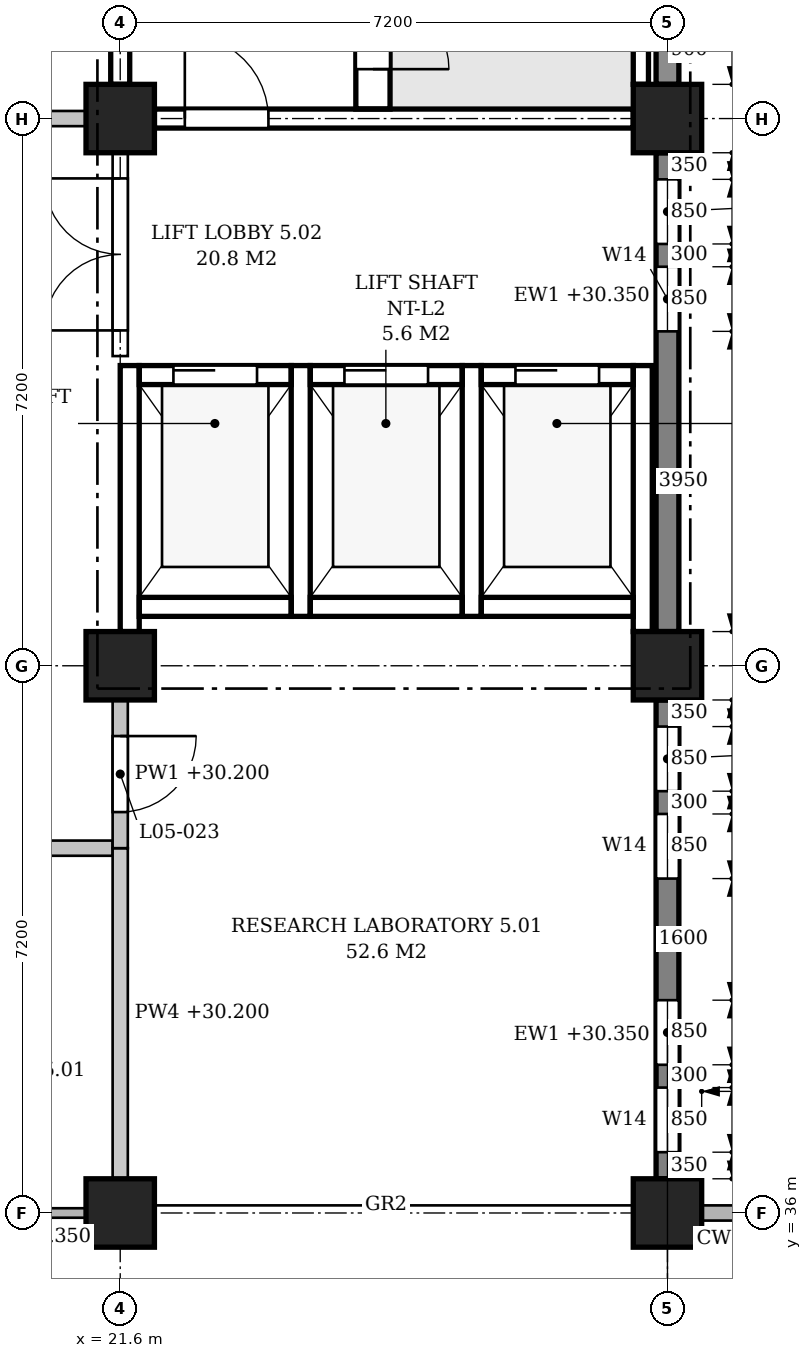
"""IFC4 building model, lengths in metres.
Left out: names, types, materials, properties, quantities, classifications, styles, units other than length and angle.
Written with IfcOpenShell. Run it as: python <this file> out.ifc"""

import sys

from ifc_helpers import new_model, si_unit, direction, frame, frame_2d, origin, origin_2d, place, context, subcontext, project, spatial, polyline, rectangle, outline, extrude, element, fill, save


model = new_model("IFC4")
c1 = context("Model", 3, precision=1e-05, world=origin(), true_north=direction((0.0, 1.0)))
c2 = subcontext(c1, "Body", "Model", "MODEL_VIEW")
j1 = project(units=[si_unit("LENGTHUNIT", "METRE"), si_unit("PLANEANGLEUNIT", "RADIAN")], contexts=[c1])
p1 = place(None, origin())
s1 = spatial("IfcSite", under=j1, at=p1, CompositionType="ELEMENT")
p2 = place(p1, origin())
s2 = spatial("IfcBuilding", under=s1, at=p2, CompositionType="ELEMENT")
p3 = place(p2, frame((0.0, 0.0, 26.4)))
s3 = spatial("IfcBuildingStorey", under=s2, at=p3, CompositionType="ELEMENT", Elevation=26.4)
for number, where, z_axis, x_axis in (
    (1, (21.6, 36.0, 0.0), (0.0, 0.0, 1.0), (1.0, 0.0, 0.0)),
    (2, (21.6, 43.2, 0.0), (0.0, 0.0, 1.0), (1.0, 0.0, 0.0)),
    (3, (21.6, 50.4, 0.0), (0.0, 0.0, 1.0), (1.0, 0.0, 0.0)),
    (4, (28.8, 36.0, 0.0), (0.0, 0.0, 1.0), (1.0, 0.0, 0.0)),
    (5, (28.8, 43.2, 0.0), (0.0, 0.0, 1.0), (1.0, 0.0, 0.0)),
    (6, (28.8, 50.4, 0.0), (0.0, 0.0, 1.0), (1.0, 0.0, 0.0)),
):
    element("IfcColumn", number, at=place(p3, frame(where, z_axis=z_axis, x_axis=x_axis)), inside=s3, PredefinedType="COLUMN", context=c2, shape_type="SweptSolid", body=[
        extrude(rectangle(XDim=0.9, YDim=0.9, at=origin_2d()), origin(), (0.0, 0.0, 1.0), 4.8),
    ])
p4 = place(p3, frame((28.8, 36.45, 0.0), z_axis=(0.0, 0.0, 1.0), x_axis=(0.0, 1.0, 0.0)))
e7 = element("IfcWall", 7, at=p4, inside=s3, PredefinedType="STANDARD", context=c2, shape_type="SweptSolid", body=[
    extrude(rectangle(XDim=6.3, YDim=0.3, at=frame_2d((3.15, 0.0))), origin(), (0.0, 0.0, 1.0), 3.95),
])
p5 = place(p4, frame((0.35, 0.0, 0.9)))
e8 = element("IfcOpeningElement", 8, at=p5, cuts=e7, PredefinedType="OPENING", context=c2, shape_type="SweptSolid", body=[
    extrude(outline(polyline([(0.0, 0.0), (0.85, 0.0), (0.85, 2.05), (0.425, 2.5), (0.0, 2.05), (0.0, 0.0)])), frame((0.0, 0.16, 0.0), z_axis=(0.0, -1.0, 0.0), x_axis=(1.0, 0.0, 0.0)), (0.0, 0.0, 1.0), 0.32),
])
p6 = place(p4, frame((1.5, 0.0, 0.9)))
e9 = element("IfcOpeningElement", 9, at=p6, cuts=e7, PredefinedType="OPENING", context=c2, shape_type="SweptSolid", body=[
    extrude(outline(polyline([(0.0, 0.0), (0.85, 0.0), (0.85, 2.05), (0.425, 2.5), (0.0, 2.05), (0.0, 0.0)])), frame((0.0, 0.16, 0.0), z_axis=(0.0, -1.0, 0.0), x_axis=(1.0, 0.0, 0.0)), (0.0, 0.0, 1.0), 0.32),
])
p7 = place(p4, frame((3.95, 0.0, 0.9)))
e10 = element("IfcOpeningElement", 10, at=p7, cuts=e7, PredefinedType="OPENING", context=c2, shape_type="SweptSolid", body=[
    extrude(outline(polyline([(0.0, 0.0), (0.85, 0.0), (0.85, 2.05), (0.425, 2.5), (0.0, 2.05), (0.0, 0.0)])), frame((0.0, 0.16, 0.0), z_axis=(0.0, -1.0, 0.0), x_axis=(1.0, 0.0, 0.0)), (0.0, 0.0, 1.0), 0.32),
])
p8 = place(p4, frame((5.1, 0.0, 0.9)))
e11 = element("IfcOpeningElement", 11, at=p8, cuts=e7, PredefinedType="OPENING", context=c2, shape_type="SweptSolid", body=[
    extrude(outline(polyline([(0.0, 0.0), (0.85, 0.0), (0.85, 2.05), (0.425, 2.5), (0.0, 2.05), (0.0, 0.0)])), frame((0.0, 0.16, 0.0), z_axis=(0.0, -1.0, 0.0), x_axis=(1.0, 0.0, 0.0)), (0.0, 0.0, 1.0), 0.32),
])
p9 = place(p3, frame((28.8, 43.65, 0.0), z_axis=(0.0, 0.0, 1.0), x_axis=(0.0, 1.0, 0.0)))
e12 = element("IfcWall", 12, at=p9, inside=s3, PredefinedType="STANDARD", context=c2, shape_type="SweptSolid", body=[
    extrude(rectangle(XDim=6.3, YDim=0.3, at=frame_2d((3.15, 0.0))), origin(), (0.0, 0.0, 1.0), 3.95),
])
p10 = place(p9, frame((3.95, 0.0, 0.9)))
e13 = element("IfcOpeningElement", 13, at=p10, cuts=e12, PredefinedType="OPENING", context=c2, shape_type="SweptSolid", body=[
    extrude(outline(polyline([(0.0, 0.0), (0.85, 0.0), (0.85, 2.05), (0.425, 2.5), (0.0, 2.05), (0.0, 0.0)])), frame((0.0, 0.16, 0.0), z_axis=(0.0, -1.0, 0.0), x_axis=(1.0, 0.0, 0.0)), (0.0, 0.0, 1.0), 0.32),
])
p11 = place(p9, frame((5.1, 0.0, 0.9)))
e14 = element("IfcOpeningElement", 14, at=p11, cuts=e12, PredefinedType="OPENING", context=c2, shape_type="SweptSolid", body=[
    extrude(outline(polyline([(0.0, 0.0), (0.85, 0.0), (0.85, 2.05), (0.425, 2.5), (0.0, 2.05), (0.0, 0.0)])), frame((0.0, 0.16, 0.0), z_axis=(0.0, -1.0, 0.0), x_axis=(1.0, 0.0, 0.0)), (0.0, 0.0, 1.0), 0.32),
])
p12 = place(p3, frame((28.8, 50.85, 0.0), z_axis=(0.0, 0.0, 1.0), x_axis=(0.0, 1.0, 0.0)))
e15 = element("IfcWall", 15, at=p12, inside=s3, PredefinedType="STANDARD", context=c2, shape_type="SweptSolid", body=[
    extrude(rectangle(XDim=6.3, YDim=0.3, at=frame_2d((3.15, 0.0))), origin(), (0.0, 0.0, 1.0), 3.95),
])
p13 = place(p12, frame((0.9, 0.0, 0.9)))
e16 = element("IfcOpeningElement", 16, at=p13, cuts=e15, PredefinedType="OPENING", context=c2, shape_type="SweptSolid", body=[
    extrude(outline(polyline([(0.0, 0.0), (0.9, 0.0), (0.9, 2.05), (0.45, 2.5), (0.0, 2.05), (0.0, 0.0)])), frame((0.0, 0.16, 0.0), z_axis=(0.0, -1.0, 0.0), x_axis=(1.0, 0.0, 0.0)), (0.0, 0.0, 1.0), 0.32),
])
p14 = place(p12, frame((4.5, 0.0, 0.9)))
e17 = element("IfcOpeningElement", 17, at=p14, cuts=e15, PredefinedType="OPENING", context=c2, shape_type="SweptSolid", body=[
    extrude(outline(polyline([(0.0, 0.0), (0.9, 0.0), (0.9, 2.05), (0.45, 2.5), (0.0, 2.05), (0.0, 0.0)])), frame((0.0, 0.16, 0.0), z_axis=(0.0, -1.0, 0.0), x_axis=(1.0, 0.0, 0.0)), (0.0, 0.0, 1.0), 0.32),
])
p15 = place(p3, frame((22.05, 50.4, 0.0), z_axis=(0.0, 0.0, 1.0), x_axis=(1.0, 0.0, 0.0)))
e18 = element("IfcWall", 18, at=p15, inside=s3, PredefinedType="SHEAR", context=c2, shape_type="SweptSolid", body=[
    extrude(rectangle(XDim=6.3, YDim=0.25, at=frame_2d((3.15, 0.0))), origin(), (0.0, 0.0, 1.0), 3.8),
])
p16 = place(p15, frame((0.4, 0.0, 0.0)))
e19 = element("IfcOpeningElement", 19, at=p16, cuts=e18, PredefinedType="OPENING", context=c2, shape_type="SweptSolid", body=[
    extrude(rectangle(XDim=1.1, YDim=2.1, at=frame_2d((0.55, 1.05))), frame((0.0, 0.135, 0.0), z_axis=(0.0, -1.0, 0.0), x_axis=(1.0, 0.0, 0.0)), (0.0, 0.0, 1.0), 0.27),
])
p17 = place(p3, frame((21.6, 50.85, 0.0), z_axis=(0.0, 0.0, 1.0), x_axis=(0.0, 1.0, 0.0)))
e20 = element("IfcWall", 20, at=p17, inside=s3, PredefinedType="SHEAR", context=c2, shape_type="SweptSolid", body=[
    extrude(rectangle(XDim=6.3, YDim=0.25, at=frame_2d((3.15, 0.0))), origin(), (0.0, 0.0, 1.0), 3.8),
])
p18 = place(p3, frame((28.45, 50.85, -0.25), z_axis=(0.0, 0.0, 1.0), x_axis=(0.0, 1.0, 0.0)))
e21 = element("IfcWall", 21, at=p18, inside=s3, PredefinedType="SHEAR", context=c2, shape_type="SweptSolid", body=[
    extrude(rectangle(XDim=0.9, YDim=0.2, at=frame_2d((0.45, 0.0))), origin(), (0.0, 0.0, 1.0), 4.8),
])
p19 = place(p3, frame((24.925, 50.525, 0.0), z_axis=(0.0, 0.0, 1.0), x_axis=(0.0, 1.0, 0.0)))
e22 = element("IfcWall", 22, at=p19, inside=s3, PredefinedType="SHEAR", context=c2, shape_type="SweptSolid", body=[
    extrude(rectangle(XDim=6.85, YDim=0.45, at=frame_2d((3.425, 0.0))), origin(), (0.0, 0.0, 1.0), 4.55),
])
p20 = place(p19, frame((0.525, 0.0, 0.0)))
e23 = element("IfcOpeningElement", 23, at=p20, cuts=e22, PredefinedType="OPENING", context=c2, shape_type="SweptSolid", body=[
    extrude(rectangle(XDim=1.0, YDim=2.1, at=frame_2d((0.5, 1.05))), frame((0.0, 0.235, 0.0), z_axis=(0.0, -1.0, 0.0), x_axis=(1.0, 0.0, 0.0)), (0.0, 0.0, 1.0), 0.47),
])
p21 = place(p3, frame((21.725, 43.65, -0.25), z_axis=(0.0, 0.0, 1.0), x_axis=(0.0, 1.0, 0.0)))
e24 = element("IfcWall", 24, at=p21, inside=s3, PredefinedType="SHEAR", context=c2, shape_type="SweptSolid", body=[
    extrude(rectangle(XDim=3.5, YDim=0.25, at=frame_2d((1.75, 0.0))), origin(), (0.0, 0.0, 1.0), 4.05),
])
for number, where, z_axis, x_axis in (
    (25, (23.975, 43.85, -0.25), (0.0, 0.0, 1.0), (0.0, 1.0, 0.0)),
    (26, (26.225, 43.85, -0.25), (0.0, 0.0, 1.0), (0.0, 1.0, 0.0)),
):
    element("IfcWall", number, at=place(p3, frame(where, z_axis=z_axis, x_axis=x_axis)), inside=s3, PredefinedType="SHEAR", context=c2, shape_type="SweptSolid", body=[
        extrude(rectangle(XDim=3.3, YDim=0.25, at=frame_2d((1.65, 0.0))), origin(), (0.0, 0.0, 1.0), 4.8),
    ])
p22 = place(p3, frame((28.475, 43.65, -0.25), z_axis=(0.0, 0.0, 1.0), x_axis=(0.0, 1.0, 0.0)))
e27 = element("IfcWall", 27, at=p22, inside=s3, PredefinedType="SHEAR", context=c2, shape_type="SweptSolid", body=[
    extrude(rectangle(XDim=3.5, YDim=0.25, at=frame_2d((1.75, 0.0))), origin(), (0.0, 0.0, 1.0), 4.8),
])
p23 = place(p3, frame((21.85, 47.025, -0.25), z_axis=(0.0, 0.0, 1.0), x_axis=(1.0, 0.0, 0.0)))
e28 = element("IfcWall", 28, at=p23, inside=s3, PredefinedType="SHEAR", context=c2, shape_type="SweptSolid", body=[
    extrude(rectangle(XDim=2.0, YDim=0.25, at=frame_2d((1.0, 0.0))), origin(), (0.0, 0.0, 1.0), 4.8),
])
p24 = place(p23, frame((0.45, 0.0, 0.25)))
e29 = element("IfcOpeningElement", 29, at=p24, cuts=e28, PredefinedType="OPENING", context=c2, shape_type="SweptSolid", body=[
    extrude(rectangle(XDim=1.1, YDim=2.1, at=frame_2d((0.55, 1.05))), frame((0.0, 0.135, 0.0), z_axis=(0.0, -1.0, 0.0), x_axis=(1.0, 0.0, 0.0)), (0.0, 0.0, 1.0), 0.27),
])
p25 = place(p3, frame((21.85, 43.975, -0.25), z_axis=(0.0, 0.0, 1.0), x_axis=(1.0, 0.0, 0.0)))
e30 = element("IfcWall", 30, at=p25, inside=s3, PredefinedType="SHEAR", context=c2, shape_type="SweptSolid", body=[
    extrude(rectangle(XDim=2.0, YDim=0.25, at=frame_2d((1.0, 0.0))), origin(), (0.0, 0.0, 1.0), 4.8),
])
p26 = place(p3, frame((24.1, 47.025, -0.25), z_axis=(0.0, 0.0, 1.0), x_axis=(1.0, 0.0, 0.0)))
e31 = element("IfcWall", 31, at=p26, inside=s3, PredefinedType="SHEAR", context=c2, shape_type="SweptSolid", body=[
    extrude(rectangle(XDim=2.0, YDim=0.25, at=frame_2d((1.0, 0.0))), origin(), (0.0, 0.0, 1.0), 4.8),
])
p27 = place(p26, frame((0.45, 0.0, 0.25)))
e32 = element("IfcOpeningElement", 32, at=p27, cuts=e31, PredefinedType="OPENING", context=c2, shape_type="SweptSolid", body=[
    extrude(rectangle(XDim=1.1, YDim=2.1, at=frame_2d((0.55, 1.05))), frame((0.0, 0.135, 0.0), z_axis=(0.0, -1.0, 0.0), x_axis=(1.0, 0.0, 0.0)), (0.0, 0.0, 1.0), 0.27),
])
p28 = place(p3, frame((24.1, 43.975, -0.25), z_axis=(0.0, 0.0, 1.0), x_axis=(1.0, 0.0, 0.0)))
e33 = element("IfcWall", 33, at=p28, inside=s3, PredefinedType="SHEAR", context=c2, shape_type="SweptSolid", body=[
    extrude(rectangle(XDim=2.0, YDim=0.25, at=frame_2d((1.0, 0.0))), origin(), (0.0, 0.0, 1.0), 4.8),
])
p29 = place(p3, frame((26.35, 47.025, -0.25), z_axis=(0.0, 0.0, 1.0), x_axis=(1.0, 0.0, 0.0)))
e34 = element("IfcWall", 34, at=p29, inside=s3, PredefinedType="SHEAR", context=c2, shape_type="SweptSolid", body=[
    extrude(rectangle(XDim=2.0, YDim=0.25, at=frame_2d((1.0, 0.0))), origin(), (0.0, 0.0, 1.0), 4.8),
])
p30 = place(p29, frame((0.45, 0.0, 0.25)))
e35 = element("IfcOpeningElement", 35, at=p30, cuts=e34, PredefinedType="OPENING", context=c2, shape_type="SweptSolid", body=[
    extrude(rectangle(XDim=1.1, YDim=2.1, at=frame_2d((0.55, 1.05))), frame((0.0, 0.135, 0.0), z_axis=(0.0, -1.0, 0.0), x_axis=(1.0, 0.0, 0.0)), (0.0, 0.0, 1.0), 0.27),
])
p31 = place(p3, frame((26.35, 43.975, -0.25), z_axis=(0.0, 0.0, 1.0), x_axis=(1.0, 0.0, 0.0)))
e36 = element("IfcWall", 36, at=p31, inside=s3, PredefinedType="SHEAR", context=c2, shape_type="SweptSolid", body=[
    extrude(rectangle(XDim=2.0, YDim=0.25, at=frame_2d((1.0, 0.0))), origin(), (0.0, 0.0, 1.0), 4.8),
])
p32 = place(p3, frame((18.1, 40.8, 0.0), z_axis=(0.0, 0.0, 1.0), x_axis=(1.0, 0.0, 0.0)))
e37 = element("IfcWall", 37, at=p32, inside=s3, PredefinedType="PARTITIONING", context=c2, shape_type="SweptSolid", body=[
    extrude(outline(polyline([(0.0, 0.0), (3.4, 0.0), (3.4, 3.8), (3.25, 3.8), (3.25, 4.55), (0.0, 4.55), (0.0, 0.0)])), frame((0.0, 0.1, 0.0), z_axis=(0.0, -1.0, 0.0), x_axis=(1.0, 0.0, 0.0)), (0.0, 0.0, 1.0), 0.2),
])
p33 = place(p32, frame((1.2, 0.0, 0.0)))
e38 = element("IfcOpeningElement", 38, at=p33, cuts=e37, PredefinedType="OPENING", context=c2, shape_type="SweptSolid", body=[
    extrude(rectangle(XDim=1.0, YDim=2.1, at=frame_2d((0.5, 1.05))), frame((0.0, 0.11, 0.0), z_axis=(0.0, -1.0, 0.0), x_axis=(1.0, 0.0, 0.0)), (0.0, 0.0, 1.0), 0.22),
])
p34 = place(p3, frame((14.85, 50.4, 0.0), z_axis=(0.0, 0.0, 1.0), x_axis=(1.0, 0.0, 0.0)))
e39 = element("IfcWall", 39, at=p34, inside=s3, PredefinedType="PARTITIONING", context=c2, shape_type="SweptSolid", body=[
    extrude(rectangle(XDim=6.3, YDim=0.2, at=frame_2d((3.15, 0.0))), origin(), (0.0, 0.0, 1.0), 3.8),
])
p35 = place(p34, frame((4.225, 0.0, 0.0)))
e40 = element("IfcOpeningElement", 40, at=p35, cuts=e39, PredefinedType="OPENING", context=c2, shape_type="SweptSolid", body=[
    extrude(rectangle(XDim=1.0, YDim=2.1, at=frame_2d((0.5, 1.05))), frame((0.0, 0.11, 0.0), z_axis=(0.0, -1.0, 0.0), x_axis=(1.0, 0.0, 0.0)), (0.0, 0.0, 1.0), 0.22),
])
p36 = place(p3, frame((21.6, 36.45, 0.0), z_axis=(0.0, 0.0, 1.0), x_axis=(0.0, 1.0, 0.0)))
e41 = element("IfcWall", 41, at=p36, inside=s3, PredefinedType="PARTITIONING", context=c2, shape_type="SweptSolid", body=[
    extrude(rectangle(XDim=4.35, YDim=0.2, at=frame_2d((2.175, 0.0))), origin(), (0.0, 0.0, 1.0), 3.8),
])
p37 = place(p3, frame((21.6, 40.8, 0.0), z_axis=(0.0, 0.0, 1.0), x_axis=(0.0, 1.0, 0.0)))
e42 = element("IfcWall", 42, at=p37, inside=s3, PredefinedType="PARTITIONING", context=c2, shape_type="SweptSolid", body=[
    extrude(rectangle(XDim=1.95, YDim=0.2, at=frame_2d((0.975, 0.0))), origin(), (0.0, 0.0, 1.0), 3.8),
])
p38 = place(p37, frame((0.475, 0.0, 0.0)))
e43 = element("IfcOpeningElement", 43, at=p38, cuts=e42, PredefinedType="OPENING", context=c2, shape_type="SweptSolid", body=[
    extrude(rectangle(XDim=1.0, YDim=2.1, at=frame_2d((0.5, 1.05))), frame((0.0, 0.11, 0.0), z_axis=(0.0, -1.0, 0.0), x_axis=(1.0, 0.0, 0.0)), (0.0, 0.0, 1.0), 0.22),
])
p39 = place(p3, frame((21.6, 47.275, 0.0), z_axis=(0.0, 0.0, 1.0), x_axis=(0.0, 1.0, 0.0)))
e44 = element("IfcWall", 44, at=p39, inside=s3, PredefinedType="PARTITIONING", context=c2, shape_type="SweptSolid", body=[
    extrude(rectangle(XDim=2.675, YDim=0.2, at=frame_2d((1.337, 0.0))), origin(), (0.0, 0.0, 1.0), 3.8),
])
p40 = place(p39, frame((0.337, 0.0, 0.0)))
e45 = element("IfcOpeningElement", 45, at=p40, cuts=e44, PredefinedType="OPENING", context=c2, shape_type="SweptSolid", body=[
    extrude(rectangle(XDim=2.0, YDim=2.4, at=frame_2d((1.0, 1.2))), frame((0.0, 0.11, 0.0), z_axis=(0.0, -1.0, 0.0), x_axis=(1.0, 0.0, 0.0)), (0.0, 0.0, 1.0), 0.22),
])
p41 = place(p5, origin())
e46 = element("IfcWindow", 46, at=p41, inside=s3, PartitioningType="SINGLE_PANEL", PredefinedType="WINDOW", context=c2, shape_type="SweptSolid", body=[
    extrude(outline(polyline([(0.0, 0.0), (0.85, 0.0), (0.85, 2.05), (0.425, 2.5), (0.0, 2.05), (0.0, 0.0)])), frame((0.0, 0.03, 0.0), z_axis=(0.0, -1.0, 0.0), x_axis=(1.0, 0.0, 0.0)), (0.0, 0.0, 1.0), 0.06),
])
fill(e8, e46)
p42 = place(p6, origin())
e47 = element("IfcWindow", 47, at=p42, inside=s3, PartitioningType="SINGLE_PANEL", PredefinedType="WINDOW", context=c2, shape_type="SweptSolid", body=[
    extrude(outline(polyline([(0.0, 0.0), (0.85, 0.0), (0.85, 2.05), (0.425, 2.5), (0.0, 2.05), (0.0, 0.0)])), frame((0.0, 0.03, 0.0), z_axis=(0.0, -1.0, 0.0), x_axis=(1.0, 0.0, 0.0)), (0.0, 0.0, 1.0), 0.06),
])
fill(e9, e47)
p43 = place(p7, origin())
e48 = element("IfcWindow", 48, at=p43, inside=s3, PartitioningType="SINGLE_PANEL", PredefinedType="WINDOW", context=c2, shape_type="SweptSolid", body=[
    extrude(outline(polyline([(0.0, 0.0), (0.85, 0.0), (0.85, 2.05), (0.425, 2.5), (0.0, 2.05), (0.0, 0.0)])), frame((0.0, 0.03, 0.0), z_axis=(0.0, -1.0, 0.0), x_axis=(1.0, 0.0, 0.0)), (0.0, 0.0, 1.0), 0.06),
])
fill(e10, e48)
p44 = place(p8, origin())
e49 = element("IfcWindow", 49, at=p44, inside=s3, PartitioningType="SINGLE_PANEL", PredefinedType="WINDOW", context=c2, shape_type="SweptSolid", body=[
    extrude(outline(polyline([(0.0, 0.0), (0.85, 0.0), (0.85, 2.05), (0.425, 2.5), (0.0, 2.05), (0.0, 0.0)])), frame((0.0, 0.03, 0.0), z_axis=(0.0, -1.0, 0.0), x_axis=(1.0, 0.0, 0.0)), (0.0, 0.0, 1.0), 0.06),
])
fill(e11, e49)
p45 = place(p10, origin())
e50 = element("IfcWindow", 50, at=p45, inside=s3, PartitioningType="SINGLE_PANEL", PredefinedType="WINDOW", context=c2, shape_type="SweptSolid", body=[
    extrude(outline(polyline([(0.0, 0.0), (0.85, 0.0), (0.85, 2.05), (0.425, 2.5), (0.0, 2.05), (0.0, 0.0)])), frame((0.0, 0.03, 0.0), z_axis=(0.0, -1.0, 0.0), x_axis=(1.0, 0.0, 0.0)), (0.0, 0.0, 1.0), 0.06),
])
fill(e13, e50)
p46 = place(p11, origin())
e51 = element("IfcWindow", 51, at=p46, inside=s3, PartitioningType="SINGLE_PANEL", PredefinedType="WINDOW", context=c2, shape_type="SweptSolid", body=[
    extrude(outline(polyline([(0.0, 0.0), (0.85, 0.0), (0.85, 2.05), (0.425, 2.5), (0.0, 2.05), (0.0, 0.0)])), frame((0.0, 0.03, 0.0), z_axis=(0.0, -1.0, 0.0), x_axis=(1.0, 0.0, 0.0)), (0.0, 0.0, 1.0), 0.06),
])
fill(e14, e51)
p47 = place(p20, frame((1.0, 0.0, 0.0), z_axis=(0.0, 0.0, 1.0), x_axis=(-1.0, 0.0, 0.0)))
e52 = element("IfcDoor", 52, at=p47, inside=s3, OperationType="SINGLE_SWING_RIGHT", PredefinedType="DOOR", context=c2, shape_type="SweptSolid", body=[
    extrude(rectangle(XDim=1.0, YDim=2.1, at=frame_2d((0.5, 1.05))), frame((0.0, 0.025, 0.0), z_axis=(0.0, -1.0, 0.0), x_axis=(1.0, 0.0, 0.0)), (0.0, 0.0, 1.0), 0.05),
])
fill(e23, e52)
p48 = place(p16, origin())
e53 = element("IfcDoor", 53, at=p48, inside=s3, OperationType="SINGLE_SWING_LEFT", PredefinedType="DOOR", context=c2, shape_type="SweptSolid", body=[
    extrude(rectangle(XDim=1.1, YDim=2.1, at=frame_2d((0.55, 1.05))), frame((0.0, 0.025, 0.0), z_axis=(0.0, -1.0, 0.0), x_axis=(1.0, 0.0, 0.0)), (0.0, 0.0, 1.0), 0.05),
])
fill(e19, e53)
p49 = place(p24, origin())
e54 = element("IfcDoor", 54, at=p49, inside=s3, OperationType="SLIDING_TO_LEFT", PredefinedType="DOOR", context=c2, shape_type="SweptSolid", body=[
    extrude(rectangle(XDim=1.1, YDim=2.1, at=frame_2d((0.55, 1.05))), frame((0.0, 0.025, 0.0), z_axis=(0.0, -1.0, 0.0), x_axis=(1.0, 0.0, 0.0)), (0.0, 0.0, 1.0), 0.05),
])
fill(e29, e54)
p50 = place(p27, origin())
e55 = element("IfcDoor", 55, at=p50, inside=s3, OperationType="SLIDING_TO_LEFT", PredefinedType="DOOR", context=c2, shape_type="SweptSolid", body=[
    extrude(rectangle(XDim=1.1, YDim=2.1, at=frame_2d((0.55, 1.05))), frame((0.0, 0.025, 0.0), z_axis=(0.0, -1.0, 0.0), x_axis=(1.0, 0.0, 0.0)), (0.0, 0.0, 1.0), 0.05),
])
fill(e32, e55)
p51 = place(p30, origin())
e56 = element("IfcDoor", 56, at=p51, inside=s3, OperationType="SLIDING_TO_LEFT", PredefinedType="DOOR", context=c2, shape_type="SweptSolid", body=[
    extrude(rectangle(XDim=1.1, YDim=2.1, at=frame_2d((0.55, 1.05))), frame((0.0, 0.025, 0.0), z_axis=(0.0, -1.0, 0.0), x_axis=(1.0, 0.0, 0.0)), (0.0, 0.0, 1.0), 0.05),
])
fill(e35, e56)
p52 = place(p40, origin())
e57 = element("IfcDoor", 57, at=p52, inside=s3, OperationType="DOUBLE_DOOR_SINGLE_SWING", PredefinedType="DOOR", context=c2, shape_type="SweptSolid", body=[
    extrude(rectangle(XDim=2.0, YDim=2.4, at=frame_2d((1.0, 1.2))), frame((0.0, 0.025, 0.0), z_axis=(0.0, -1.0, 0.0), x_axis=(1.0, 0.0, 0.0)), (0.0, 0.0, 1.0), 0.05),
])
fill(e45, e57)
p53 = place(p38, frame((1.0, 0.0, 0.0), z_axis=(0.0, 0.0, 1.0), x_axis=(-1.0, 0.0, 0.0)))
e58 = element("IfcDoor", 58, at=p53, inside=s3, OperationType="SINGLE_SWING_LEFT", PredefinedType="DOOR", context=c2, shape_type="SweptSolid", body=[
    extrude(rectangle(XDim=1.0, YDim=2.1, at=frame_2d((0.5, 1.05))), frame((0.0, 0.025, 0.0), z_axis=(0.0, -1.0, 0.0), x_axis=(1.0, 0.0, 0.0)), (0.0, 0.0, 1.0), 0.05),
])
fill(e43, e58)
save(model, sys.argv[1])
